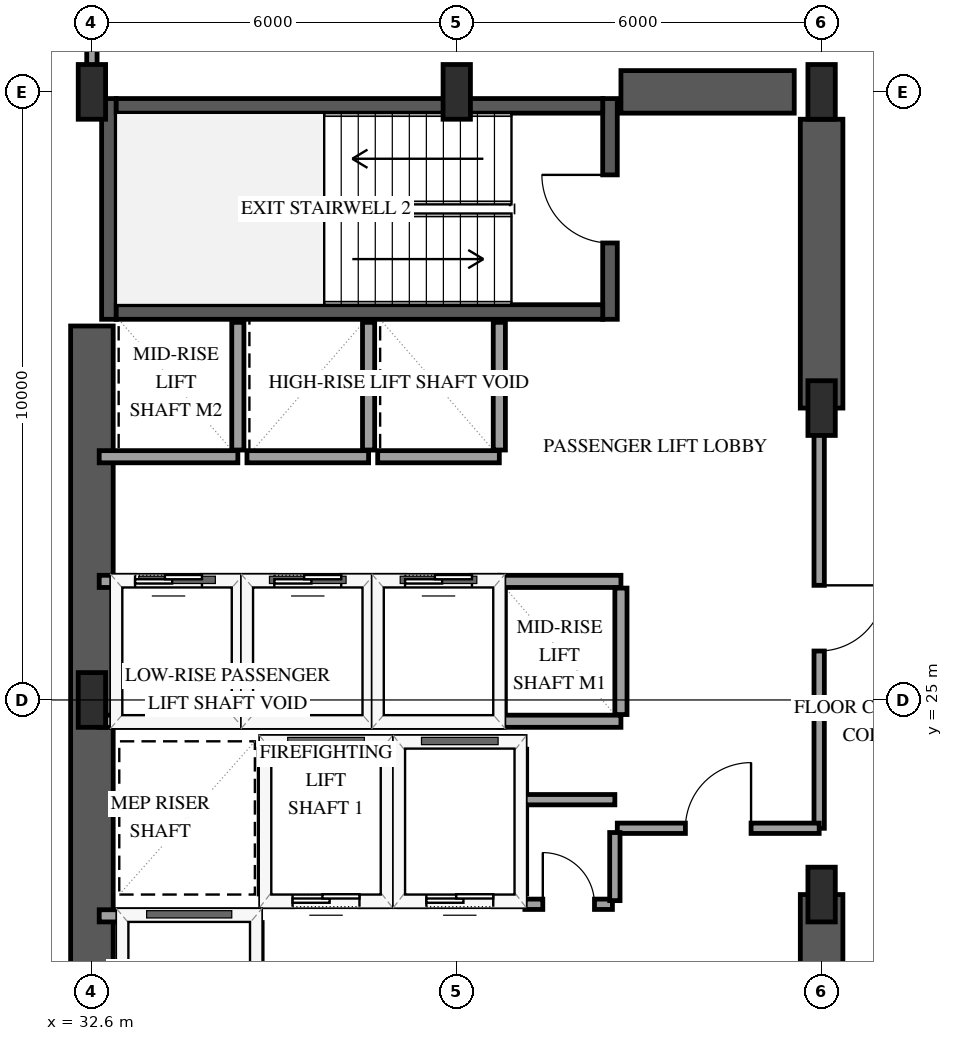
"""IFC4 building model, lengths in metres.
Left out: names, types, materials, properties, quantities, classifications, styles, units other than length and angle.
Written with IfcOpenShell. Run it as: python <this file> out.ifc"""

import sys

from ifc_helpers import new_model, si_unit, direction, frame, frame_2d, origin, origin_2d, place, context, subcontext, project, spatial, rectangle, extrude, element, fill, save


model = new_model("IFC4")
c1 = context("Model", 3, precision=1e-05, world=origin(), true_north=direction((0.0, 1.0)))
c2 = subcontext(c1, "Body", "Model", "MODEL_VIEW")
j1 = project(units=[si_unit("LENGTHUNIT", "METRE"), si_unit("PLANEANGLEUNIT", "RADIAN")], contexts=[c1])
p1 = place(None, origin())
s1 = spatial("IfcSite", under=j1, at=p1, CompositionType="ELEMENT")
p2 = place(p1, origin())
s2 = spatial("IfcBuilding", under=s1, at=p2, CompositionType="ELEMENT")
p3 = place(p2, frame((0.0, 0.0, 70.6)))
s3 = spatial("IfcBuildingStorey", under=s2, at=p3, CompositionType="ELEMENT", Elevation=70.6)
p4 = place(p3, frame((32.88, 31.26, 0.0), z_axis=(0.0, 0.0, 1.0), x_axis=(0.0, 1.0, 0.0)))
e1 = element("IfcWall", 1, at=p4, inside=s3, PredefinedType="SHEAR", context=c2, shape_type="SweptSolid", body=[
    extrude(rectangle(XDim=3.63, YDim=0.24, at=frame_2d((1.815, 0.0))), origin(), (0.0, 0.0, 1.0), 4.0),
])
p5 = place(p3, frame((41.12, 31.26, 0.0), z_axis=(0.0, 0.0, 1.0), x_axis=(0.0, 1.0, 0.0)))
e2 = element("IfcWall", 2, at=p5, inside=s3, PredefinedType="SHEAR", context=c2, shape_type="SweptSolid", body=[
    extrude(rectangle(XDim=3.63, YDim=0.24, at=frame_2d((1.815, 0.0))), origin(), (0.0, 0.0, 1.0), 4.0),
])
p6 = place(p5, frame((1.255, 0.0, 0.0)))
e3 = element("IfcOpeningElement", 3, at=p6, cuts=e2, PredefinedType="OPENING", context=c2, shape_type="SweptSolid", body=[
    extrude(rectangle(XDim=1.12, YDim=2.15, at=frame_2d((0.56, 1.075))), frame((0.0, 0.13, 0.0), z_axis=(0.0, -1.0, 0.0), x_axis=(1.0, 0.0, 0.0)), (0.0, 0.0, 1.0), 0.26),
])
for number, where, z_axis, x_axis in (
    (4, (33.0, 31.38, 0.0), (0.0, 0.0, 1.0), (1.0, 0.0, 0.0)),
    (5, (33.0, 34.77, 0.0), (0.0, 0.0, 1.0), (1.0, 0.0, 0.0)),
):
    element("IfcWall", number, at=place(p3, frame(where, z_axis=z_axis, x_axis=x_axis)), inside=s3, PredefinedType="SHEAR", context=c2, shape_type="SweptSolid", body=[
        extrude(rectangle(XDim=8.0, YDim=0.24, at=frame_2d((4.0, 0.0))), origin(), (0.0, 0.0, 1.0), 4.0),
    ])
p7 = place(p3, frame((32.6, 18.85, 0.0), z_axis=(0.0, 0.0, 1.0), x_axis=(0.0, 1.0, 0.0)))
e6 = element("IfcWall", 6, at=p7, inside=s3, PredefinedType="SHEAR", context=c2, shape_type="SweptSolid", body=[
    extrude(rectangle(XDim=12.3, YDim=0.7, at=frame_2d((6.15, 0.0))), origin(), (0.0, 0.0, 1.0), 4.0),
])
p8 = place(p3, frame((41.3, 35.0, 0.0), z_axis=(0.0, 0.0, 1.0), x_axis=(1.0, 0.0, 0.0)))
e7 = element("IfcWall", 7, at=p8, inside=s3, PredefinedType="SHEAR", context=c2, shape_type="SweptSolid", body=[
    extrude(rectangle(XDim=2.85, YDim=0.7, at=frame_2d((1.425, 0.0))), origin(), (0.0, 0.0, 1.0), 4.0),
])
p9 = place(p3, frame((44.6, 15.45, 0.0), z_axis=(0.0, 0.0, 1.0), x_axis=(0.0, 1.0, 0.0)))
e8 = element("IfcWall", 8, at=p9, inside=s3, PredefinedType="SHEAR", context=c2, shape_type="SweptSolid", body=[
    extrude(rectangle(XDim=6.35, YDim=0.7, at=frame_2d((3.175, 0.0))), origin(), (0.0, 0.0, 1.0), 4.0),
])
p10 = place(p3, frame((44.6, 29.8, 0.0), z_axis=(0.0, 0.0, 1.0), x_axis=(0.0, 1.0, 0.0)))
e9 = element("IfcWall", 9, at=p10, inside=s3, PredefinedType="SHEAR", context=c2, shape_type="SweptSolid", body=[
    extrude(rectangle(XDim=4.75, YDim=0.7, at=frame_2d((2.375, 0.0))), origin(), (0.0, 0.0, 1.0), 4.0),
])
for number, where, z_axis, x_axis in (
    (10, (32.6, 25.0, 0.0), (0.0, 0.0, 1.0), (1.0, 0.0, 0.0)),
    (11, (32.6, 35.0, 0.0), (0.0, 0.0, 1.0), (1.0, 0.0, 0.0)),
    (12, (38.6, 35.0, 0.0), (0.0, 0.0, 1.0), (1.0, 0.0, 0.0)),
    (13, (44.6, 21.8, 0.0), (0.0, 0.0, 1.0), (1.0, 0.0, 0.0)),
    (14, (44.6, 29.8, 0.0), (0.0, 0.0, 1.0), (1.0, 0.0, 0.0)),
    (15, (44.6, 35.0, 0.0), (0.0, 0.0, 1.0), (1.0, 0.0, 0.0)),
):
    element("IfcColumn", number, at=place(p3, frame(where, z_axis=z_axis, x_axis=x_axis)), inside=s3, PredefinedType="PILASTER", context=c2, shape_type="SweptSolid", body=[
        extrude(rectangle(XDim=0.45, YDim=0.9, at=origin_2d()), origin(), (0.0, 0.0, 1.0), 4.0),
    ])
p11 = place(p3, frame((35.45, 21.7, 0.0), z_axis=(0.0, 0.0, 1.0), x_axis=(1.0, 0.0, 0.0)))
e16 = element("IfcWall", 16, at=p11, inside=s3, PredefinedType="SOLIDWALL", context=c2, shape_type="SweptSolid", body=[
    extrude(rectangle(XDim=2.0, YDim=0.2, at=frame_2d((1.0, 0.0))), origin(), (0.0, 0.0, 1.0), 3.7),
])
p12 = place(p11, frame((0.45, 0.0, 0.0)))
e17 = element("IfcOpeningElement", 17, at=p12, cuts=e16, PredefinedType="OPENING", context=c2, shape_type="SweptSolid", body=[
    extrude(rectangle(XDim=1.1, YDim=2.15, at=frame_2d((0.55, 1.075))), frame((0.0, 0.11, 0.0), z_axis=(0.0, -1.0, 0.0), x_axis=(1.0, 0.0, 0.0)), (0.0, 0.0, 1.0), 0.22),
])
p13 = place(p3, frame((35.45, 24.3, 0.0), z_axis=(0.0, 0.0, 1.0), x_axis=(1.0, 0.0, 0.0)))
e18 = element("IfcWall", 18, at=p13, inside=s3, PredefinedType="SOLIDWALL", context=c2, shape_type="SweptSolid", body=[
    extrude(rectangle(XDim=2.0, YDim=0.2, at=frame_2d((1.0, 0.0))), origin(), (0.0, 0.0, 1.0), 3.7),
])
for number, where, z_axis, x_axis in (
    (19, (35.45, 21.81, 0.0), (0.0, 0.0, 1.0), (0.0, 1.0, 0.0)),
    (20, (37.45, 21.81, 0.0), (0.0, 0.0, 1.0), (0.0, 1.0, 0.0)),
):
    element("IfcWall", number, at=place(p3, frame(where, z_axis=z_axis, x_axis=x_axis)), inside=s3, PredefinedType="SOLIDWALL", context=c2, shape_type="SweptSolid", body=[
        extrude(rectangle(XDim=2.38, YDim=0.2, at=frame_2d((1.19, 0.0))), origin(), (0.0, 0.0, 1.0), 3.7),
    ])
p14 = place(p3, frame((37.65, 21.7, 0.0), z_axis=(0.0, 0.0, 1.0), x_axis=(1.0, 0.0, 0.0)))
e21 = element("IfcWall", 21, at=p14, inside=s3, PredefinedType="SOLIDWALL", context=c2, shape_type="SweptSolid", body=[
    extrude(rectangle(XDim=2.0, YDim=0.2, at=frame_2d((1.0, 0.0))), origin(), (0.0, 0.0, 1.0), 3.7),
])
p15 = place(p14, frame((0.45, 0.0, 0.0)))
e22 = element("IfcOpeningElement", 22, at=p15, cuts=e21, PredefinedType="OPENING", context=c2, shape_type="SweptSolid", body=[
    extrude(rectangle(XDim=1.1, YDim=2.15, at=frame_2d((0.55, 1.075))), frame((0.0, 0.11, 0.0), z_axis=(0.0, -1.0, 0.0), x_axis=(1.0, 0.0, 0.0)), (0.0, 0.0, 1.0), 0.22),
])
p16 = place(p3, frame((37.65, 24.3, 0.0), z_axis=(0.0, 0.0, 1.0), x_axis=(1.0, 0.0, 0.0)))
e23 = element("IfcWall", 23, at=p16, inside=s3, PredefinedType="SOLIDWALL", context=c2, shape_type="SweptSolid", body=[
    extrude(rectangle(XDim=2.0, YDim=0.2, at=frame_2d((1.0, 0.0))), origin(), (0.0, 0.0, 1.0), 3.7),
])
p17 = place(p3, frame((39.65, 21.81, 0.0), z_axis=(0.0, 0.0, 1.0), x_axis=(0.0, 1.0, 0.0)))
e24 = element("IfcWall", 24, at=p17, inside=s3, PredefinedType="SOLIDWALL", context=c2, shape_type="SweptSolid", body=[
    extrude(rectangle(XDim=2.38, YDim=0.2, at=frame_2d((1.19, 0.0))), origin(), (0.0, 0.0, 1.0), 3.7),
])
p18 = place(p3, frame((32.72, 21.45, 0.0), z_axis=(0.0, 0.0, 1.0), x_axis=(1.0, 0.0, 0.0)))
e25 = element("IfcWall", 25, at=p18, inside=s3, PredefinedType="SOLIDWALL", context=c2, shape_type="SweptSolid", body=[
    extrude(rectangle(XDim=2.58, YDim=0.2, at=frame_2d((1.29, 0.0))), origin(), (0.0, 0.0, 1.0), 3.7),
])
p19 = place(p3, frame((35.3, 18.79, 0.0), z_axis=(0.0, 0.0, 1.0), x_axis=(0.0, 1.0, 0.0)))
e26 = element("IfcWall", 26, at=p19, inside=s3, PredefinedType="SOLIDWALL", context=c2, shape_type="SweptSolid", body=[
    extrude(rectangle(XDim=2.55, YDim=0.2, at=frame_2d((1.275, 0.0))), origin(), (0.0, 0.0, 1.0), 3.7),
])
p20 = place(p19, frame((0.725, 0.0, 0.0)))
e27 = element("IfcOpeningElement", 27, at=p20, cuts=e26, PredefinedType="OPENING", context=c2, shape_type="SweptSolid", body=[
    extrude(rectangle(XDim=1.1, YDim=2.15, at=frame_2d((0.55, 1.075))), frame((0.0, 0.11, 0.0), z_axis=(0.0, -1.0, 0.0), x_axis=(1.0, 0.0, 0.0)), (0.0, 0.0, 1.0), 0.22),
])
p21 = place(p3, frame((32.72, 24.65, 0.0), z_axis=(0.0, 0.0, 1.0), x_axis=(1.0, 0.0, 0.0)))
e28 = element("IfcWall", 28, at=p21, inside=s3, PredefinedType="SOLIDWALL", context=c2, shape_type="SweptSolid", body=[
    extrude(rectangle(XDim=2.28, YDim=0.2, at=frame_2d((1.14, 0.0))), origin(), (0.0, 0.0, 1.0), 3.7),
])
p22 = place(p3, frame((32.72, 26.95, 0.0), z_axis=(0.0, 0.0, 1.0), x_axis=(1.0, 0.0, 0.0)))
e29 = element("IfcWall", 29, at=p22, inside=s3, PredefinedType="SOLIDWALL", context=c2, shape_type="SweptSolid", body=[
    extrude(rectangle(XDim=2.28, YDim=0.2, at=frame_2d((1.14, 0.0))), origin(), (0.0, 0.0, 1.0), 3.7),
])
p23 = place(p22, frame((0.59, 0.0, 0.0)))
e30 = element("IfcOpeningElement", 30, at=p23, cuts=e29, PredefinedType="OPENING", context=c2, shape_type="SweptSolid", body=[
    extrude(rectangle(XDim=1.1, YDim=2.15, at=frame_2d((0.55, 1.075))), frame((0.0, 0.11, 0.0), z_axis=(0.0, -1.0, 0.0), x_axis=(1.0, 0.0, 0.0)), (0.0, 0.0, 1.0), 0.22),
])
p24 = place(p3, frame((35.0, 24.76, 0.0), z_axis=(0.0, 0.0, 1.0), x_axis=(0.0, 1.0, 0.0)))
e31 = element("IfcWall", 31, at=p24, inside=s3, PredefinedType="SOLIDWALL", context=c2, shape_type="SweptSolid", body=[
    extrude(rectangle(XDim=2.08, YDim=0.2, at=frame_2d((1.04, 0.0))), origin(), (0.0, 0.0, 1.0), 3.7),
])
p25 = place(p3, frame((35.15, 24.65, 0.0), z_axis=(0.0, 0.0, 1.0), x_axis=(1.0, 0.0, 0.0)))
e32 = element("IfcWall", 32, at=p25, inside=s3, PredefinedType="SOLIDWALL", context=c2, shape_type="SweptSolid", body=[
    extrude(rectangle(XDim=2.0, YDim=0.2, at=frame_2d((1.0, 0.0))), origin(), (0.0, 0.0, 1.0), 3.7),
])
p26 = place(p3, frame((35.15, 26.95, 0.0), z_axis=(0.0, 0.0, 1.0), x_axis=(1.0, 0.0, 0.0)))
e33 = element("IfcWall", 33, at=p26, inside=s3, PredefinedType="SOLIDWALL", context=c2, shape_type="SweptSolid", body=[
    extrude(rectangle(XDim=2.0, YDim=0.2, at=frame_2d((1.0, 0.0))), origin(), (0.0, 0.0, 1.0), 3.7),
])
p27 = place(p26, frame((0.45, 0.0, 0.0)))
e34 = element("IfcOpeningElement", 34, at=p27, cuts=e33, PredefinedType="OPENING", context=c2, shape_type="SweptSolid", body=[
    extrude(rectangle(XDim=1.1, YDim=2.15, at=frame_2d((0.55, 1.075))), frame((0.0, 0.11, 0.0), z_axis=(0.0, -1.0, 0.0), x_axis=(1.0, 0.0, 0.0)), (0.0, 0.0, 1.0), 0.22),
])
p28 = place(p3, frame((37.15, 24.76, 0.0), z_axis=(0.0, 0.0, 1.0), x_axis=(0.0, 1.0, 0.0)))
e35 = element("IfcWall", 35, at=p28, inside=s3, PredefinedType="SOLIDWALL", context=c2, shape_type="SweptSolid", body=[
    extrude(rectangle(XDim=2.08, YDim=0.2, at=frame_2d((1.04, 0.0))), origin(), (0.0, 0.0, 1.0), 3.7),
])
p29 = place(p3, frame((37.3, 24.65, 0.0), z_axis=(0.0, 0.0, 1.0), x_axis=(1.0, 0.0, 0.0)))
e36 = element("IfcWall", 36, at=p29, inside=s3, PredefinedType="SOLIDWALL", context=c2, shape_type="SweptSolid", body=[
    extrude(rectangle(XDim=2.0, YDim=0.2, at=frame_2d((1.0, 0.0))), origin(), (0.0, 0.0, 1.0), 3.7),
])
p30 = place(p3, frame((37.3, 26.95, 0.0), z_axis=(0.0, 0.0, 1.0), x_axis=(1.0, 0.0, 0.0)))
e37 = element("IfcWall", 37, at=p30, inside=s3, PredefinedType="SOLIDWALL", context=c2, shape_type="SweptSolid", body=[
    extrude(rectangle(XDim=2.0, YDim=0.2, at=frame_2d((1.0, 0.0))), origin(), (0.0, 0.0, 1.0), 3.7),
])
p31 = place(p30, frame((0.45, 0.0, 0.0)))
e38 = element("IfcOpeningElement", 38, at=p31, cuts=e37, PredefinedType="OPENING", context=c2, shape_type="SweptSolid", body=[
    extrude(rectangle(XDim=1.1, YDim=2.15, at=frame_2d((0.55, 1.075))), frame((0.0, 0.11, 0.0), z_axis=(0.0, -1.0, 0.0), x_axis=(1.0, 0.0, 0.0)), (0.0, 0.0, 1.0), 0.22),
])
p32 = place(p3, frame((39.3, 24.76, 0.0), z_axis=(0.0, 0.0, 1.0), x_axis=(0.0, 1.0, 0.0)))
e39 = element("IfcWall", 39, at=p32, inside=s3, PredefinedType="SOLIDWALL", context=c2, shape_type="SweptSolid", body=[
    extrude(rectangle(XDim=2.08, YDim=0.2, at=frame_2d((1.04, 0.0))), origin(), (0.0, 0.0, 1.0), 3.7),
])
for number, where, z_axis, x_axis in (
    (40, (39.3, 24.65, 0.0), (0.0, 0.0, 1.0), (1.0, 0.0, 0.0)),
    (41, (39.3, 26.95, 0.0), (0.0, 0.0, 1.0), (1.0, 0.0, 0.0)),
):
    element("IfcWall", number, at=place(p3, frame(where, z_axis=z_axis, x_axis=x_axis)), inside=s3, PredefinedType="SOLIDWALL", context=c2, shape_type="SweptSolid", body=[
        extrude(rectangle(XDim=2.0, YDim=0.2, at=frame_2d((1.0, 0.0))), origin(), (0.0, 0.0, 1.0), 3.7),
    ])
p33 = place(p3, frame((41.3, 24.76, 0.0), z_axis=(0.0, 0.0, 1.0), x_axis=(0.0, 1.0, 0.0)))
e42 = element("IfcWall", 42, at=p33, inside=s3, PredefinedType="SOLIDWALL", context=c2, shape_type="SweptSolid", body=[
    extrude(rectangle(XDim=2.08, YDim=0.2, at=frame_2d((1.04, 0.0))), origin(), (0.0, 0.0, 1.0), 3.7),
])
p34 = place(p3, frame((32.72, 29.0, 0.0), z_axis=(0.0, 0.0, 1.0), x_axis=(1.0, 0.0, 0.0)))
e43 = element("IfcWall", 43, at=p34, inside=s3, PredefinedType="SOLIDWALL", context=c2, shape_type="SweptSolid", body=[
    extrude(rectangle(XDim=2.28, YDim=0.2, at=frame_2d((1.14, 0.0))), origin(), (0.0, 0.0, 1.0), 3.7),
])
p35 = place(p3, frame((35.0, 29.11, 0.0), z_axis=(0.0, 0.0, 1.0), x_axis=(0.0, 1.0, 0.0)))
e44 = element("IfcWall", 44, at=p35, inside=s3, PredefinedType="SOLIDWALL", context=c2, shape_type="SweptSolid", body=[
    extrude(rectangle(XDim=2.1, YDim=0.2, at=frame_2d((1.05, 0.0))), origin(), (0.0, 0.0, 1.0), 3.7),
])
p36 = place(p3, frame((35.15, 29.0, 0.0), z_axis=(0.0, 0.0, 1.0), x_axis=(1.0, 0.0, 0.0)))
e45 = element("IfcWall", 45, at=p36, inside=s3, PredefinedType="SOLIDWALL", context=c2, shape_type="SweptSolid", body=[
    extrude(rectangle(XDim=2.0, YDim=0.2, at=frame_2d((1.0, 0.0))), origin(), (0.0, 0.0, 1.0), 3.7),
])
p37 = place(p3, frame((37.15, 29.11, 0.0), z_axis=(0.0, 0.0, 1.0), x_axis=(0.0, 1.0, 0.0)))
e46 = element("IfcWall", 46, at=p37, inside=s3, PredefinedType="SOLIDWALL", context=c2, shape_type="SweptSolid", body=[
    extrude(rectangle(XDim=2.1, YDim=0.2, at=frame_2d((1.05, 0.0))), origin(), (0.0, 0.0, 1.0), 3.7),
])
p38 = place(p3, frame((37.3, 29.0, 0.0), z_axis=(0.0, 0.0, 1.0), x_axis=(1.0, 0.0, 0.0)))
e47 = element("IfcWall", 47, at=p38, inside=s3, PredefinedType="SOLIDWALL", context=c2, shape_type="SweptSolid", body=[
    extrude(rectangle(XDim=2.0, YDim=0.2, at=frame_2d((1.0, 0.0))), origin(), (0.0, 0.0, 1.0), 3.7),
])
p39 = place(p3, frame((39.3, 29.11, 0.0), z_axis=(0.0, 0.0, 1.0), x_axis=(0.0, 1.0, 0.0)))
e48 = element("IfcWall", 48, at=p39, inside=s3, PredefinedType="SOLIDWALL", context=c2, shape_type="SweptSolid", body=[
    extrude(rectangle(XDim=2.1, YDim=0.2, at=frame_2d((1.05, 0.0))), origin(), (0.0, 0.0, 1.0), 3.7),
])
p40 = place(p3, frame((44.56, 29.8, 0.0), z_axis=(0.0, 0.0, 1.0), x_axis=(0.0, -1.0, 0.0)))
e49 = element("IfcWall", 49, at=p40, inside=s3, PredefinedType="PARTITIONING", context=c2, shape_type="SweptSolid", body=[
    extrude(rectangle(XDim=6.91, YDim=0.17, at=frame_2d((3.455, 0.0))), origin(), (0.0, 0.0, 1.0), 2.74),
])
p41 = place(p40, frame((2.915, 0.0, 0.0)))
e50 = element("IfcOpeningElement", 50, at=p41, cuts=e49, PredefinedType="OPENING", context=c2, shape_type="SweptSolid", body=[
    extrude(rectangle(XDim=1.08, YDim=2.15, at=frame_2d((0.54, 1.075))), frame((0.0, 0.095, 0.0), z_axis=(0.0, -1.0, 0.0), x_axis=(1.0, 0.0, 0.0)), (0.0, 0.0, 1.0), 0.19),
])
p42 = place(p3, frame((41.24, 22.89, 0.0), z_axis=(0.0, 0.0, 1.0), x_axis=(1.0, 0.0, 0.0)))
e51 = element("IfcWall", 51, at=p42, inside=s3, PredefinedType="PARTITIONING", context=c2, shape_type="SweptSolid", body=[
    extrude(rectangle(XDim=3.32, YDim=0.17, at=frame_2d((1.66, 0.0))), origin(), (0.0, 0.0, 1.0), 3.7),
])
p43 = place(p42, frame((1.12, 0.0, 0.0)))
e52 = element("IfcOpeningElement", 52, at=p43, cuts=e51, PredefinedType="OPENING", context=c2, shape_type="SweptSolid", body=[
    extrude(rectangle(XDim=1.08, YDim=2.15, at=frame_2d((0.54, 1.075))), frame((0.0, 0.095, 0.0), z_axis=(0.0, -1.0, 0.0), x_axis=(1.0, 0.0, 0.0)), (0.0, 0.0, 1.0), 0.19),
])
p44 = place(p3, frame((32.6, 35.07, 0.0), z_axis=(0.0, 0.0, 1.0), x_axis=(0.0, 1.0, 0.0)))
e53 = element("IfcWall", 53, at=p44, inside=s3, PredefinedType="PARTITIONING", context=c2, shape_type="SweptSolid", body=[
    extrude(rectangle(XDim=1.91, YDim=0.17, at=frame_2d((0.955, 0.0))), origin(), (0.0, 0.0, 1.0), 3.7),
])
p45 = place(p3, frame((39.72, 21.64, 0.0), z_axis=(0.0, 0.0, 1.0), x_axis=(1.0, 0.0, 0.0)))
e54 = element("IfcWall", 54, at=p45, inside=s3, PredefinedType="PARTITIONING", context=c2, shape_type="SweptSolid", body=[
    extrude(rectangle(XDim=1.44, YDim=0.17, at=frame_2d((0.72, 0.0))), origin(), (0.0, 0.0, 1.0), 3.7),
])
p46 = place(p45, frame((0.295, 0.0, 0.0)))
e55 = element("IfcOpeningElement", 55, at=p46, cuts=e54, PredefinedType="OPENING", context=c2, shape_type="SweptSolid", body=[
    extrude(rectangle(XDim=0.85, YDim=2.1, at=frame_2d((0.425, 1.05))), frame((0.0, 0.095, 0.0), z_axis=(0.0, -1.0, 0.0), x_axis=(1.0, 0.0, 0.0)), (0.0, 0.0, 1.0), 0.19),
])
p47 = place(p3, frame((41.2, 21.7, 0.0), z_axis=(0.0, 0.0, 1.0), x_axis=(0.0, 1.0, 0.0)))
e56 = element("IfcWall", 56, at=p47, inside=s3, PredefinedType="PARTITIONING", context=c2, shape_type="SweptSolid", body=[
    extrude(rectangle(XDim=1.12, YDim=0.17, at=frame_2d((0.56, 0.0))), origin(), (0.0, 0.0, 1.0), 3.7),
])
p48 = place(p3, frame((41.2, 23.36, 0.0), z_axis=(0.0, 0.0, 1.0), x_axis=(-1.0, 0.0, 0.0)))
e57 = element("IfcWall", 57, at=p48, inside=s3, PredefinedType="PARTITIONING", context=c2, shape_type="SweptSolid", body=[
    extrude(rectangle(XDim=1.48, YDim=0.17, at=frame_2d((0.74, 0.0))), origin(), (0.0, 0.0, 1.0), 3.7),
])
p49 = place(p12, origin())
e58 = element("IfcDoor", 58, at=p49, inside=s3, OperationType="SLIDING_TO_LEFT", PredefinedType="DOOR", context=c2, shape_type="SweptSolid", body=[
    extrude(rectangle(XDim=1.1, YDim=2.15, at=frame_2d((0.55, 1.075))), frame((0.0, 0.025, 0.0), z_axis=(0.0, -1.0, 0.0), x_axis=(1.0, 0.0, 0.0)), (0.0, 0.0, 1.0), 0.05),
])
fill(e17, e58)
p50 = place(p15, origin())
e59 = element("IfcDoor", 59, at=p50, inside=s3, OperationType="SLIDING_TO_LEFT", PredefinedType="DOOR", context=c2, shape_type="SweptSolid", body=[
    extrude(rectangle(XDim=1.1, YDim=2.15, at=frame_2d((0.55, 1.075))), frame((0.0, 0.025, 0.0), z_axis=(0.0, -1.0, 0.0), x_axis=(1.0, 0.0, 0.0)), (0.0, 0.0, 1.0), 0.05),
])
fill(e22, e59)
p51 = place(p23, origin())
e60 = element("IfcDoor", 60, at=p51, inside=s3, OperationType="SLIDING_TO_LEFT", PredefinedType="DOOR", context=c2, shape_type="SweptSolid", body=[
    extrude(rectangle(XDim=1.1, YDim=2.15, at=frame_2d((0.55, 1.075))), frame((0.0, 0.025, 0.0), z_axis=(0.0, -1.0, 0.0), x_axis=(1.0, 0.0, 0.0)), (0.0, 0.0, 1.0), 0.05),
])
fill(e30, e60)
p52 = place(p27, origin())
e61 = element("IfcDoor", 61, at=p52, inside=s3, OperationType="SLIDING_TO_LEFT", PredefinedType="DOOR", context=c2, shape_type="SweptSolid", body=[
    extrude(rectangle(XDim=1.1, YDim=2.15, at=frame_2d((0.55, 1.075))), frame((0.0, 0.025, 0.0), z_axis=(0.0, -1.0, 0.0), x_axis=(1.0, 0.0, 0.0)), (0.0, 0.0, 1.0), 0.05),
])
fill(e34, e61)
p53 = place(p31, origin())
e62 = element("IfcDoor", 62, at=p53, inside=s3, OperationType="SLIDING_TO_LEFT", PredefinedType="DOOR", context=c2, shape_type="SweptSolid", body=[
    extrude(rectangle(XDim=1.1, YDim=2.15, at=frame_2d((0.55, 1.075))), frame((0.0, 0.025, 0.0), z_axis=(0.0, -1.0, 0.0), x_axis=(1.0, 0.0, 0.0)), (0.0, 0.0, 1.0), 0.05),
])
fill(e38, e62)
p54 = place(p6, origin())
e63 = element("IfcDoor", 63, at=p54, inside=s3, OperationType="SINGLE_SWING_RIGHT", PredefinedType="DOOR", context=c2, shape_type="SweptSolid", body=[
    extrude(rectangle(XDim=1.12, YDim=2.15, at=frame_2d((0.56, 1.075))), frame((0.0, 0.025, 0.0), z_axis=(0.0, -1.0, 0.0), x_axis=(1.0, 0.0, 0.0)), (0.0, 0.0, 1.0), 0.05),
])
fill(e3, e63)
p55 = place(p41, origin())
e64 = element("IfcDoor", 64, at=p55, inside=s3, OperationType="SINGLE_SWING_LEFT", PredefinedType="DOOR", context=c2, shape_type="SweptSolid", body=[
    extrude(rectangle(XDim=1.08, YDim=2.15, at=frame_2d((0.54, 1.075))), frame((0.0, 0.025, 0.0), z_axis=(0.0, -1.0, 0.0), x_axis=(1.0, 0.0, 0.0)), (0.0, 0.0, 1.0), 0.05),
])
fill(e50, e64)
p56 = place(p43, origin())
e65 = element("IfcDoor", 65, at=p56, inside=s3, OperationType="SINGLE_SWING_RIGHT", PredefinedType="DOOR", context=c2, shape_type="SweptSolid", body=[
    extrude(rectangle(XDim=1.08, YDim=2.15, at=frame_2d((0.54, 1.075))), frame((0.0, 0.025, 0.0), z_axis=(0.0, -1.0, 0.0), x_axis=(1.0, 0.0, 0.0)), (0.0, 0.0, 1.0), 0.05),
])
fill(e52, e65)
p57 = place(p46, origin())
e66 = element("IfcDoor", 66, at=p57, inside=s3, OperationType="SINGLE_SWING_LEFT", PredefinedType="DOOR", context=c2, shape_type="SweptSolid", body=[
    extrude(rectangle(XDim=0.85, YDim=2.1, at=frame_2d((0.425, 1.05))), frame((0.0, 0.025, 0.0), z_axis=(0.0, -1.0, 0.0), x_axis=(1.0, 0.0, 0.0)), (0.0, 0.0, 1.0), 0.05),
])
fill(e55, e66)
save(model, sys.argv[1])
